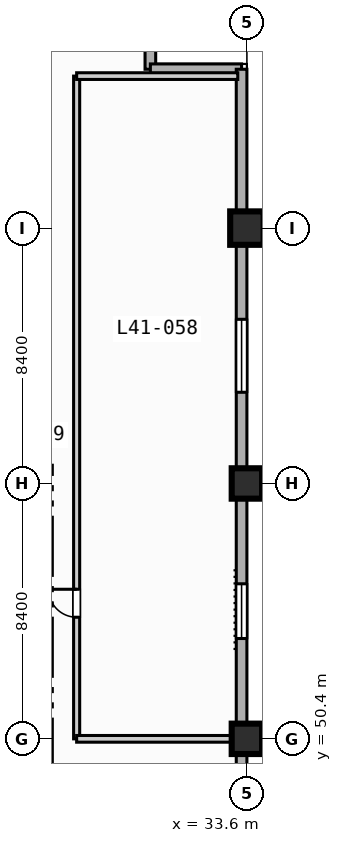
"""IFC4 building model, lengths in metres.
Left out: names, types, materials, properties, quantities, classifications, styles, units other than length and angle.
Written with IfcOpenShell. Run it as: python <this file> out.ifc"""

import sys

from ifc_helpers import new_model, si_unit, direction, frame, frame_2d, origin, origin_2d, place, context, subcontext, project, spatial, rectangle, extrude, element, fill, save


model = new_model("IFC4")
c1 = context("Model", 3, precision=1e-05, world=origin(), true_north=direction((0.0, 1.0)))
c2 = subcontext(c1, "Body", "Model", "MODEL_VIEW")
j1 = project(units=[si_unit("LENGTHUNIT", "METRE"), si_unit("PLANEANGLEUNIT", "RADIAN")], contexts=[c1])
p1 = place(None, origin())
s1 = spatial("IfcSite", under=j1, at=p1, CompositionType="ELEMENT")
p2 = place(p1, origin())
s2 = spatial("IfcBuilding", under=s1, at=p2, CompositionType="ELEMENT")
p3 = place(p2, frame((0.0, 0.0, 171.7)))
s3 = spatial("IfcBuildingStorey", under=s2, at=p3, CompositionType="ELEMENT", Elevation=171.7)
for number, where, z_axis, x_axis in (
    (1, (33.6, 50.4, 0.0), (0.0, 0.0, 1.0), (1.0, 0.0, 0.0)),
    (2, (33.6, 58.8, 0.0), (0.0, 0.0, 1.0), (1.0, 0.0, 0.0)),
):
    element("IfcColumn", number, at=place(p3, frame(where, z_axis=z_axis, x_axis=x_axis)), inside=s3, PredefinedType="COLUMN", context=c2, shape_type="SweptSolid", body=[
        extrude(rectangle(XDim=1.0, YDim=1.0, at=origin_2d()), origin(), (0.0, 0.0, 1.0), 3.7),
    ])
p4 = place(p3, frame((33.6, 67.2, 0.0), z_axis=(0.0, 0.0, 1.0), x_axis=(1.0, 0.0, 0.0)))
e3 = element("IfcColumn", 3, at=p4, inside=s3, PredefinedType="COLUMN", context=c2, shape_type="SweptSolid", body=[
    extrude(rectangle(XDim=1.1, YDim=1.1, at=origin_2d()), origin(), (0.0, 0.0, 1.0), 3.7),
])
for number, where, z_axis, x_axis in (
    (4, (30.425, 75.425, 0.0), (0.0, 0.0, 1.0), (0.0, -1.0, 0.0)),
    (5, (30.425, 72.425, 0.0), (0.0, 0.0, 1.0), (1.0, 0.0, 0.0)),
):
    element("IfcWall", number, at=place(p3, frame(where, z_axis=z_axis, x_axis=x_axis)), inside=s3, PredefinedType="STANDARD", context=c2, shape_type="SweptSolid", body=[
        extrude(rectangle(XDim=3.0, YDim=0.35, at=frame_2d((1.5, 0.0))), origin(), (0.0, 0.0, 1.0), 3.47),
    ])
p5 = place(p3, frame((33.425, 72.425, 0.0), z_axis=(0.0, 0.0, 1.0), x_axis=(0.0, -1.0, 0.0)))
e6 = element("IfcWall", 6, at=p5, inside=s3, PredefinedType="STANDARD", context=c2, shape_type="SweptSolid", body=[
    extrude(rectangle(XDim=39.0, YDim=0.35, at=frame_2d((19.5, 0.0))), origin(), (0.0, 0.0, 1.0), 3.47),
])
p6 = place(p5, frame((33.725, 0.0, 0.85)))
e7 = element("IfcOpeningElement", 7, at=p6, cuts=e6, PredefinedType="OPENING", context=c2, shape_type="SweptSolid", body=[
    extrude(rectangle(XDim=1.8, YDim=1.8, at=frame_2d((0.9, 0.9))), frame((0.0, 0.185, 0.0), z_axis=(0.0, -1.0, 0.0), x_axis=(1.0, 0.0, 0.0)), (0.0, 0.0, 1.0), 0.37),
])
p7 = place(p5, frame((16.925, 0.0, 0.85)))
e8 = element("IfcOpeningElement", 8, at=p7, cuts=e6, PredefinedType="OPENING", context=c2, shape_type="SweptSolid", body=[
    extrude(rectangle(XDim=1.8, YDim=1.8, at=frame_2d((0.9, 0.9))), frame((0.0, 0.185, 0.0), z_axis=(0.0, -1.0, 0.0), x_axis=(1.0, 0.0, 0.0)), (0.0, 0.0, 1.0), 0.37),
])
p8 = place(p5, frame((8.225, 0.0, 0.85)))
e9 = element("IfcOpeningElement", 9, at=p8, cuts=e6, PredefinedType="OPENING", context=c2, shape_type="SweptSolid", body=[
    extrude(rectangle(XDim=2.4, YDim=1.95, at=frame_2d((1.2, 0.975))), frame((0.0, 0.185, 0.0), z_axis=(0.0, -1.0, 0.0), x_axis=(1.0, 0.0, 0.0)), (0.0, 0.0, 1.0), 0.37),
])
p9 = place(p3, frame((28.0, 50.4, 0.0), z_axis=(0.0, 0.0, 1.0), x_axis=(0.0, 1.0, 0.0)))
e10 = element("IfcWall", 10, at=p9, inside=s3, PredefinedType="PARTITIONING", context=c2, shape_type="SweptSolid", body=[
    extrude(rectangle(XDim=21.8, YDim=0.2, at=frame_2d((10.9, 0.0))), origin(), (0.0, 0.0, 1.0), 3.47),
])
p10 = place(p9, frame((4.0, 0.0, 0.0)))
e11 = element("IfcOpeningElement", 11, at=p10, cuts=e10, PredefinedType="OPENING", context=c2, shape_type="SweptSolid", body=[
    extrude(rectangle(XDim=0.92, YDim=2.1, at=frame_2d((0.46, 1.05))), frame((0.0, 0.11, 0.0), z_axis=(0.0, -1.0, 0.0), x_axis=(1.0, 0.0, 0.0)), (0.0, 0.0, 1.0), 0.22),
])
p11 = place(p3, frame((28.0, 50.4, 0.0), z_axis=(0.0, 0.0, 1.0), x_axis=(1.0, 0.0, 0.0)))
e12 = element("IfcWall", 12, at=p11, inside=s3, PredefinedType="PARTITIONING", context=c2, shape_type="SweptSolid", body=[
    extrude(rectangle(XDim=5.3, YDim=0.22, at=frame_2d((2.65, 0.0))), origin(), (0.0, 0.0, 1.0), 2.82),
])
p12 = place(p3, frame((28.0, 72.2, 0.0), z_axis=(0.0, 0.0, 1.0), x_axis=(1.0, 0.0, 0.0)))
e13 = element("IfcWall", 13, at=p12, inside=s3, PredefinedType="PARTITIONING", context=c2, shape_type="SweptSolid", body=[
    extrude(rectangle(XDim=5.3, YDim=0.22, at=frame_2d((2.65, 0.0))), origin(), (0.0, 0.0, 1.0), 3.47),
])
p13 = place(p7, origin())
e14 = element("IfcWindow", 14, at=p13, inside=s3, PartitioningType="SINGLE_PANEL", PredefinedType="WINDOW", context=c2, shape_type="SweptSolid", body=[
    extrude(rectangle(XDim=1.8, YDim=1.8, at=frame_2d((0.9, 0.9))), frame((0.0, 0.03, 0.0), z_axis=(0.0, -1.0, 0.0), x_axis=(1.0, 0.0, 0.0)), (0.0, 0.0, 1.0), 0.06),
])
fill(e8, e14)
p14 = place(p8, origin())
e15 = element("IfcWindow", 15, at=p14, inside=s3, PartitioningType="SINGLE_PANEL", PredefinedType="WINDOW", context=c2, shape_type="SweptSolid", body=[
    extrude(rectangle(XDim=2.4, YDim=1.95, at=frame_2d((1.2, 0.975))), frame((0.0, 0.03, 0.0), z_axis=(0.0, -1.0, 0.0), x_axis=(1.0, 0.0, 0.0)), (0.0, 0.0, 1.0), 0.06),
])
fill(e9, e15)
p15 = place(p10, origin())
e16 = element("IfcDoor", 16, at=p15, inside=s3, OperationType="SINGLE_SWING_RIGHT", PredefinedType="DOOR", context=c2, shape_type="SweptSolid", body=[
    extrude(rectangle(XDim=0.92, YDim=2.1, at=frame_2d((0.46, 1.05))), frame((0.0, 0.025, 0.0), z_axis=(0.0, -1.0, 0.0), x_axis=(1.0, 0.0, 0.0)), (0.0, 0.0, 1.0), 0.05),
])
fill(e11, e16)
save(model, sys.argv[1])
